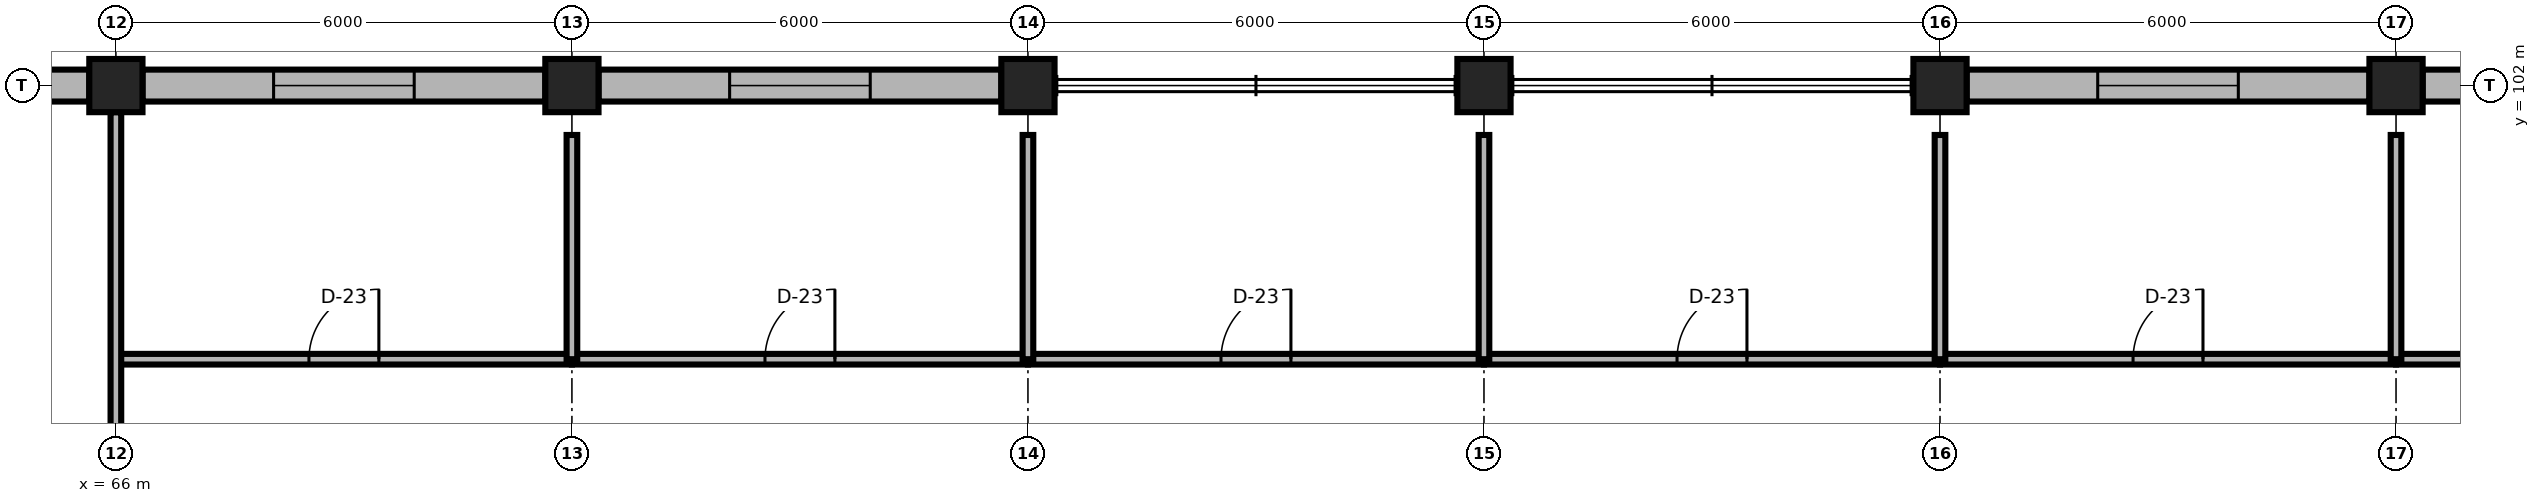
"""IFC4 building model, lengths in metres.
Left out: names, types, materials, properties, quantities, classifications, styles, units other than length and angle.
Written with IfcOpenShell. Run it as: python <this file> out.ifc"""

import sys

from ifc_helpers import new_model, si_unit, direction, frame, frame_2d, origin, origin_2d, place, context, subcontext, project, spatial, rectangle, extrude, element, fill, save


model = new_model("IFC4")
c1 = context("Model", 3, precision=1e-05, world=origin(), true_north=direction((0.0, 1.0)))
c2 = subcontext(c1, "Body", "Model", "MODEL_VIEW")
j1 = project(units=[si_unit("LENGTHUNIT", "METRE"), si_unit("PLANEANGLEUNIT", "RADIAN")], contexts=[c1])
p1 = place(None, origin())
s1 = spatial("IfcSite", under=j1, at=p1, CompositionType="ELEMENT")
p2 = place(p1, origin())
s2 = spatial("IfcBuilding", under=s1, at=p2, CompositionType="ELEMENT")
p3 = place(p2, frame((0.0, 0.0, 44.4)))
s3 = spatial("IfcBuildingStorey", under=s2, at=p3, CompositionType="ELEMENT", Elevation=44.4)
for number, where, z_axis, x_axis in (
    (1, (66.0, 102.0, 0.0), (0.0, 0.0, 1.0), (1.0, 0.0, 0.0)),
    (2, (72.0, 102.0, 0.0), (0.0, 0.0, 1.0), (1.0, 0.0, 0.0)),
    (3, (78.0, 102.0, 0.0), (0.0, 0.0, 1.0), (1.0, 0.0, 0.0)),
    (4, (84.0, 102.0, 0.0), (0.0, 0.0, 1.0), (1.0, 0.0, 0.0)),
    (5, (90.0, 102.0, 0.0), (0.0, 0.0, 1.0), (1.0, 0.0, 0.0)),
    (6, (96.0, 102.0, 0.0), (0.0, 0.0, 1.0), (1.0, 0.0, 0.0)),
):
    element("IfcColumn", number, at=place(p3, frame(where, z_axis=z_axis, x_axis=x_axis)), inside=s3, PredefinedType="COLUMN", context=c2, shape_type="SweptSolid", body=[
        extrude(rectangle(XDim=0.7, YDim=0.7, at=origin_2d()), origin(), (0.0, 0.0, 1.0), 3.9),
    ])
p4 = place(p3, frame((60.35, 102.0, 0.0), z_axis=(0.0, 0.0, 1.0), x_axis=(1.0, 0.0, 0.0)))
e7 = element("IfcWall", 7, at=p4, inside=s3, PredefinedType="SOLIDWALL", context=c2, shape_type="SweptSolid", body=[
    extrude(rectangle(XDim=5.3, YDim=0.42, at=frame_2d((2.65, 0.0))), origin(), (0.0, 0.0, 1.0), 3.32),
])
p5 = place(p4, frame((1.725, 0.0, 0.85)))
e8 = element("IfcOpeningElement", 8, at=p5, cuts=e7, PredefinedType="OPENING", context=c2, shape_type="SweptSolid", body=[
    extrude(rectangle(XDim=1.85, YDim=2.0, at=frame_2d((0.925, 1.0))), frame((0.0, 0.225, 0.0), z_axis=(0.0, -1.0, 0.0), x_axis=(1.0, 0.0, 0.0)), (0.0, 0.0, 1.0), 0.45),
])
p6 = place(p3, frame((66.35, 102.0, 0.0), z_axis=(0.0, 0.0, 1.0), x_axis=(1.0, 0.0, 0.0)))
e9 = element("IfcWall", 9, at=p6, inside=s3, PredefinedType="SOLIDWALL", context=c2, shape_type="SweptSolid", body=[
    extrude(rectangle(XDim=5.3, YDim=0.42, at=frame_2d((2.65, 0.0))), origin(), (0.0, 0.0, 1.0), 3.32),
])
p7 = place(p6, frame((1.725, 0.0, 0.85)))
e10 = element("IfcOpeningElement", 10, at=p7, cuts=e9, PredefinedType="OPENING", context=c2, shape_type="SweptSolid", body=[
    extrude(rectangle(XDim=1.85, YDim=2.0, at=frame_2d((0.925, 1.0))), frame((0.0, 0.225, 0.0), z_axis=(0.0, -1.0, 0.0), x_axis=(1.0, 0.0, 0.0)), (0.0, 0.0, 1.0), 0.45),
])
p8 = place(p3, frame((72.35, 102.0, 0.0), z_axis=(0.0, 0.0, 1.0), x_axis=(1.0, 0.0, 0.0)))
e11 = element("IfcWall", 11, at=p8, inside=s3, PredefinedType="SOLIDWALL", context=c2, shape_type="SweptSolid", body=[
    extrude(rectangle(XDim=5.3, YDim=0.42, at=frame_2d((2.65, 0.0))), origin(), (0.0, 0.0, 1.0), 3.32),
])
p9 = place(p8, frame((1.725, 0.0, 0.85)))
e12 = element("IfcOpeningElement", 12, at=p9, cuts=e11, PredefinedType="OPENING", context=c2, shape_type="SweptSolid", body=[
    extrude(rectangle(XDim=1.85, YDim=2.0, at=frame_2d((0.925, 1.0))), frame((0.0, 0.225, 0.0), z_axis=(0.0, -1.0, 0.0), x_axis=(1.0, 0.0, 0.0)), (0.0, 0.0, 1.0), 0.45),
])
p10 = place(p3, frame((90.35, 102.0, 0.0), z_axis=(0.0, 0.0, 1.0), x_axis=(1.0, 0.0, 0.0)))
e13 = element("IfcWall", 13, at=p10, inside=s3, PredefinedType="SOLIDWALL", context=c2, shape_type="SweptSolid", body=[
    extrude(rectangle(XDim=5.3, YDim=0.42, at=frame_2d((2.65, 0.0))), origin(), (0.0, 0.0, 1.0), 3.32),
])
p11 = place(p10, frame((1.725, 0.0, 0.85)))
e14 = element("IfcOpeningElement", 14, at=p11, cuts=e13, PredefinedType="OPENING", context=c2, shape_type="SweptSolid", body=[
    extrude(rectangle(XDim=1.85, YDim=2.0, at=frame_2d((0.925, 1.0))), frame((0.0, 0.225, 0.0), z_axis=(0.0, -1.0, 0.0), x_axis=(1.0, 0.0, 0.0)), (0.0, 0.0, 1.0), 0.45),
])
p12 = place(p3, frame((96.35, 102.0, 0.0), z_axis=(0.0, 0.0, 1.0), x_axis=(1.0, 0.0, 0.0)))
e15 = element("IfcWall", 15, at=p12, inside=s3, PredefinedType="SOLIDWALL", context=c2, shape_type="SweptSolid", body=[
    extrude(rectangle(XDim=5.3, YDim=0.42, at=frame_2d((2.65, 0.0))), origin(), (0.0, 0.0, 1.0), 3.32),
])
p13 = place(p12, frame((1.725, 0.0, 0.85)))
e16 = element("IfcOpeningElement", 16, at=p13, cuts=e15, PredefinedType="OPENING", context=c2, shape_type="SweptSolid", body=[
    extrude(rectangle(XDim=1.85, YDim=2.0, at=frame_2d((0.925, 1.0))), frame((0.0, 0.225, 0.0), z_axis=(0.0, -1.0, 0.0), x_axis=(1.0, 0.0, 0.0)), (0.0, 0.0, 1.0), 0.45),
])
p14 = place(p3, frame((66.0, 98.4, 0.0), z_axis=(0.0, 0.0, 1.0), x_axis=(1.0, 0.0, 0.0)))
e17 = element("IfcWall", 17, at=p14, inside=s3, PredefinedType="PARTITIONING", context=c2, shape_type="SweptSolid", body=[
    extrude(rectangle(XDim=6.0, YDim=0.14, at=frame_2d((3.0, 0.0))), origin(), (0.0, 0.0, 1.0), 3.74),
])
p15 = place(p14, frame((2.54, 0.0, 0.0)))
e18 = element("IfcOpeningElement", 18, at=p15, cuts=e17, PredefinedType="OPENING", context=c2, shape_type="SweptSolid", body=[
    extrude(rectangle(XDim=0.92, YDim=2.15, at=frame_2d((0.46, 1.075))), frame((0.0, 0.085, 0.0), z_axis=(0.0, -1.0, 0.0), x_axis=(1.0, 0.0, 0.0)), (0.0, 0.0, 1.0), 0.17),
])
p16 = place(p3, frame((72.0, 98.4, 0.0), z_axis=(0.0, 0.0, 1.0), x_axis=(1.0, 0.0, 0.0)))
e19 = element("IfcWall", 19, at=p16, inside=s3, PredefinedType="PARTITIONING", context=c2, shape_type="SweptSolid", body=[
    extrude(rectangle(XDim=6.0, YDim=0.14, at=frame_2d((3.0, 0.0))), origin(), (0.0, 0.0, 1.0), 3.74),
])
p17 = place(p16, frame((2.54, 0.0, 0.0)))
e20 = element("IfcOpeningElement", 20, at=p17, cuts=e19, PredefinedType="OPENING", context=c2, shape_type="SweptSolid", body=[
    extrude(rectangle(XDim=0.92, YDim=2.15, at=frame_2d((0.46, 1.075))), frame((0.0, 0.085, 0.0), z_axis=(0.0, -1.0, 0.0), x_axis=(1.0, 0.0, 0.0)), (0.0, 0.0, 1.0), 0.17),
])
p18 = place(p3, frame((78.0, 98.4, 0.0), z_axis=(0.0, 0.0, 1.0), x_axis=(1.0, 0.0, 0.0)))
e21 = element("IfcWall", 21, at=p18, inside=s3, PredefinedType="PARTITIONING", context=c2, shape_type="SweptSolid", body=[
    extrude(rectangle(XDim=6.0, YDim=0.14, at=frame_2d((3.0, 0.0))), origin(), (0.0, 0.0, 1.0), 3.74),
])
p19 = place(p18, frame((2.54, 0.0, 0.0)))
e22 = element("IfcOpeningElement", 22, at=p19, cuts=e21, PredefinedType="OPENING", context=c2, shape_type="SweptSolid", body=[
    extrude(rectangle(XDim=0.92, YDim=2.15, at=frame_2d((0.46, 1.075))), frame((0.0, 0.085, 0.0), z_axis=(0.0, -1.0, 0.0), x_axis=(1.0, 0.0, 0.0)), (0.0, 0.0, 1.0), 0.17),
])
p20 = place(p3, frame((84.0, 98.4, 0.0), z_axis=(0.0, 0.0, 1.0), x_axis=(1.0, 0.0, 0.0)))
e23 = element("IfcWall", 23, at=p20, inside=s3, PredefinedType="PARTITIONING", context=c2, shape_type="SweptSolid", body=[
    extrude(rectangle(XDim=6.0, YDim=0.14, at=frame_2d((3.0, 0.0))), origin(), (0.0, 0.0, 1.0), 3.74),
])
p21 = place(p20, frame((2.54, 0.0, 0.0)))
e24 = element("IfcOpeningElement", 24, at=p21, cuts=e23, PredefinedType="OPENING", context=c2, shape_type="SweptSolid", body=[
    extrude(rectangle(XDim=0.92, YDim=2.15, at=frame_2d((0.46, 1.075))), frame((0.0, 0.085, 0.0), z_axis=(0.0, -1.0, 0.0), x_axis=(1.0, 0.0, 0.0)), (0.0, 0.0, 1.0), 0.17),
])
p22 = place(p3, frame((90.0, 98.4, 0.0), z_axis=(0.0, 0.0, 1.0), x_axis=(1.0, 0.0, 0.0)))
e25 = element("IfcWall", 25, at=p22, inside=s3, PredefinedType="PARTITIONING", context=c2, shape_type="SweptSolid", body=[
    extrude(rectangle(XDim=6.0, YDim=0.14, at=frame_2d((3.0, 0.0))), origin(), (0.0, 0.0, 1.0), 3.74),
])
p23 = place(p22, frame((2.54, 0.0, 0.0)))
e26 = element("IfcOpeningElement", 26, at=p23, cuts=e25, PredefinedType="OPENING", context=c2, shape_type="SweptSolid", body=[
    extrude(rectangle(XDim=0.92, YDim=2.15, at=frame_2d((0.46, 1.075))), frame((0.0, 0.085, 0.0), z_axis=(0.0, -1.0, 0.0), x_axis=(1.0, 0.0, 0.0)), (0.0, 0.0, 1.0), 0.17),
])
p24 = place(p3, frame((96.0, 98.4, 0.0), z_axis=(0.0, 0.0, 1.0), x_axis=(1.0, 0.0, 0.0)))
e27 = element("IfcWall", 27, at=p24, inside=s3, PredefinedType="PARTITIONING", context=c2, shape_type="SweptSolid", body=[
    extrude(rectangle(XDim=6.0, YDim=0.14, at=frame_2d((3.0, 0.0))), origin(), (0.0, 0.0, 1.0), 3.74),
])
p25 = place(p24, frame((2.54, 0.0, 0.0)))
e28 = element("IfcOpeningElement", 28, at=p25, cuts=e27, PredefinedType="OPENING", context=c2, shape_type="SweptSolid", body=[
    extrude(rectangle(XDim=0.92, YDim=2.15, at=frame_2d((0.46, 1.075))), frame((0.0, 0.085, 0.0), z_axis=(0.0, -1.0, 0.0), x_axis=(1.0, 0.0, 0.0)), (0.0, 0.0, 1.0), 0.17),
])
for number, where, z_axis, x_axis in (
    (29, (72.0, 98.4, 0.0), (0.0, 0.0, 1.0), (0.0, 1.0, 0.0)),
    (30, (78.0, 98.4, 0.0), (0.0, 0.0, 1.0), (0.0, 1.0, 0.0)),
    (31, (84.0, 98.4, 0.0), (0.0, 0.0, 1.0), (0.0, 1.0, 0.0)),
    (32, (90.0, 98.4, 0.0), (0.0, 0.0, 1.0), (0.0, 1.0, 0.0)),
    (33, (96.0, 98.4, 0.0), (0.0, 0.0, 1.0), (0.0, 1.0, 0.0)),
):
    element("IfcWall", number, at=place(p3, frame(where, z_axis=z_axis, x_axis=x_axis)), inside=s3, PredefinedType="PARTITIONING", context=c2, shape_type="SweptSolid", body=[
        extrude(rectangle(XDim=2.95, YDim=0.14, at=frame_2d((1.475, 0.0))), origin(), (0.0, 0.0, 1.0), 3.348),
    ])
p26 = place(p3, frame((66.0, 96.35, 0.0), z_axis=(0.0, 0.0, 1.0), x_axis=(0.0, 1.0, 0.0)))
e34 = element("IfcWall", 34, at=p26, inside=s3, PredefinedType="PARTITIONING", context=c2, shape_type="SweptSolid", body=[
    extrude(rectangle(XDim=5.3, YDim=0.14, at=frame_2d((2.65, 0.0))), origin(), (0.0, 0.0, 1.0), 3.348),
])
p27 = place(p7, origin())
e35 = element("IfcWindow", 35, at=p27, inside=s3, PartitioningType="SINGLE_PANEL", PredefinedType="WINDOW", context=c2, shape_type="SweptSolid", body=[
    extrude(rectangle(XDim=1.85, YDim=2.0, at=frame_2d((0.925, 1.0))), frame((0.0, 0.03, 0.0), z_axis=(0.0, -1.0, 0.0), x_axis=(1.0, 0.0, 0.0)), (0.0, 0.0, 1.0), 0.06),
])
fill(e10, e35)
p28 = place(p9, origin())
e36 = element("IfcWindow", 36, at=p28, inside=s3, PartitioningType="SINGLE_PANEL", PredefinedType="WINDOW", context=c2, shape_type="SweptSolid", body=[
    extrude(rectangle(XDim=1.85, YDim=2.0, at=frame_2d((0.925, 1.0))), frame((0.0, 0.03, 0.0), z_axis=(0.0, -1.0, 0.0), x_axis=(1.0, 0.0, 0.0)), (0.0, 0.0, 1.0), 0.06),
])
fill(e12, e36)
p29 = place(p11, origin())
e37 = element("IfcWindow", 37, at=p29, inside=s3, PartitioningType="SINGLE_PANEL", PredefinedType="WINDOW", context=c2, shape_type="SweptSolid", body=[
    extrude(rectangle(XDim=1.85, YDim=2.0, at=frame_2d((0.925, 1.0))), frame((0.0, 0.03, 0.0), z_axis=(0.0, -1.0, 0.0), x_axis=(1.0, 0.0, 0.0)), (0.0, 0.0, 1.0), 0.06),
])
fill(e14, e37)
p30 = place(p15, origin())
e38 = element("IfcDoor", 38, at=p30, inside=s3, OperationType="SINGLE_SWING_RIGHT", PredefinedType="DOOR", context=c2, shape_type="SweptSolid", body=[
    extrude(rectangle(XDim=0.92, YDim=2.15, at=frame_2d((0.46, 1.075))), frame((0.0, 0.025, 0.0), z_axis=(0.0, -1.0, 0.0), x_axis=(1.0, 0.0, 0.0)), (0.0, 0.0, 1.0), 0.05),
])
fill(e18, e38)
p31 = place(p17, origin())
e39 = element("IfcDoor", 39, at=p31, inside=s3, OperationType="SINGLE_SWING_RIGHT", PredefinedType="DOOR", context=c2, shape_type="SweptSolid", body=[
    extrude(rectangle(XDim=0.92, YDim=2.15, at=frame_2d((0.46, 1.075))), frame((0.0, 0.025, 0.0), z_axis=(0.0, -1.0, 0.0), x_axis=(1.0, 0.0, 0.0)), (0.0, 0.0, 1.0), 0.05),
])
fill(e20, e39)
p32 = place(p19, origin())
e40 = element("IfcDoor", 40, at=p32, inside=s3, OperationType="SINGLE_SWING_RIGHT", PredefinedType="DOOR", context=c2, shape_type="SweptSolid", body=[
    extrude(rectangle(XDim=0.92, YDim=2.15, at=frame_2d((0.46, 1.075))), frame((0.0, 0.025, 0.0), z_axis=(0.0, -1.0, 0.0), x_axis=(1.0, 0.0, 0.0)), (0.0, 0.0, 1.0), 0.05),
])
fill(e22, e40)
p33 = place(p21, origin())
e41 = element("IfcDoor", 41, at=p33, inside=s3, OperationType="SINGLE_SWING_RIGHT", PredefinedType="DOOR", context=c2, shape_type="SweptSolid", body=[
    extrude(rectangle(XDim=0.92, YDim=2.15, at=frame_2d((0.46, 1.075))), frame((0.0, 0.025, 0.0), z_axis=(0.0, -1.0, 0.0), x_axis=(1.0, 0.0, 0.0)), (0.0, 0.0, 1.0), 0.05),
])
fill(e24, e41)
p34 = place(p23, origin())
e42 = element("IfcDoor", 42, at=p34, inside=s3, OperationType="SINGLE_SWING_RIGHT", PredefinedType="DOOR", context=c2, shape_type="SweptSolid", body=[
    extrude(rectangle(XDim=0.92, YDim=2.15, at=frame_2d((0.46, 1.075))), frame((0.0, 0.025, 0.0), z_axis=(0.0, -1.0, 0.0), x_axis=(1.0, 0.0, 0.0)), (0.0, 0.0, 1.0), 0.05),
])
fill(e26, e42)
save(model, sys.argv[1])
